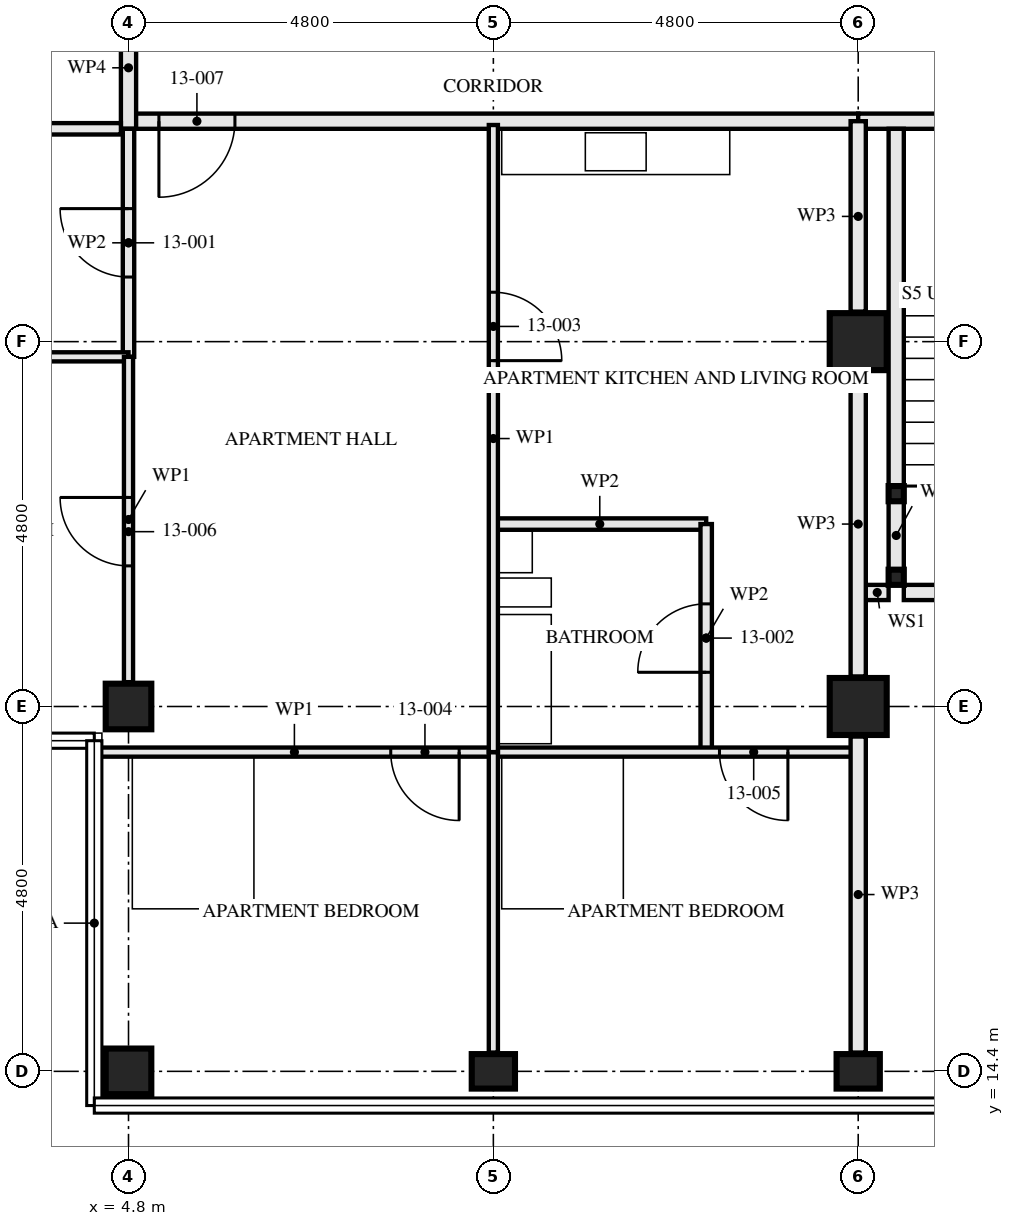
"""IFC4 building model, lengths in metres.
Left out: names, types, materials, properties, quantities, classifications, styles, units other than length and angle.
Written with IfcOpenShell. Run it as: python <this file> out.ifc"""

import sys

from ifc_helpers import new_model, si_unit, direction, frame, frame_2d, origin, origin_2d, place, context, subcontext, project, spatial, rectangle, hollow_rectangle, i_section, extrude, element, fill, save


model = new_model("IFC4")
c1 = context("Model", 3, precision=1e-05, world=origin(), true_north=direction((0.0, 1.0)))
c2 = subcontext(c1, "Body", "Model", "MODEL_VIEW")
j1 = project(units=[si_unit("LENGTHUNIT", "METRE"), si_unit("PLANEANGLEUNIT", "RADIAN")], contexts=[c1])
p1 = place(None, origin())
s1 = spatial("IfcSite", under=j1, at=p1, CompositionType="ELEMENT")
p2 = place(p1, origin())
s2 = spatial("IfcBuilding", under=s1, at=p2, CompositionType="ELEMENT")
p3 = place(p2, frame((0.0, 0.0, 51.5)))
s3 = spatial("IfcBuildingStorey", under=s2, at=p3, CompositionType="ELEMENT", Elevation=51.5)
for number, where, z_axis, x_axis in (
    (1, (4.8, 14.4, 0.0), (0.0, 0.0, 1.0), (0.0, 1.0, 0.0)),
    (2, (4.8, 19.2, 0.0), (0.0, 0.0, 1.0), (0.0, 1.0, 0.0)),
):
    element("IfcColumn", number, at=place(p3, frame(where, z_axis=z_axis, x_axis=x_axis)), inside=s3, PredefinedType="COLUMN", context=c2, shape_type="SweptSolid", body=[
        extrude(hollow_rectangle(XDim=0.6, YDim=0.6, WallThickness=0.05, at=origin_2d()), origin(), (0.0, 0.0, 1.0), 3.5),
    ])
for number, where, z_axis, x_axis in (
    (3, (9.6, 14.4, 0.0), (0.0, 0.0, 1.0), (0.0, 1.0, 0.0)),
    (4, (14.4, 14.4, 0.0), (0.0, 0.0, 1.0), (0.0, 1.0, 0.0)),
):
    element("IfcColumn", number, at=place(p3, frame(where, z_axis=z_axis, x_axis=x_axis)), inside=s3, PredefinedType="COLUMN", context=c2, shape_type="SweptSolid", body=[
        extrude(i_section(OverallWidth=0.454, OverallDepth=0.569, WebThickness=0.078, FlangeThickness=0.125, FilletRadius=0.015, at=origin_2d()), origin(), (0.0, 0.0, 1.0), 3.5),
    ])
for number, where, z_axis, x_axis in (
    (5, (14.4, 19.2, 0.0), (0.0, 0.0, 1.0), (1.0, 0.0, 0.0)),
    (6, (14.4, 24.0, 0.0), (0.0, 0.0, 1.0), (1.0, 0.0, 0.0)),
):
    element("IfcColumn", number, at=place(p3, frame(where, z_axis=z_axis, x_axis=x_axis)), inside=s3, PredefinedType="COLUMN", context=c2, shape_type="SweptSolid", body=[
        extrude(hollow_rectangle(XDim=0.75, YDim=0.75, WallThickness=0.08, at=origin_2d()), origin(), (0.0, 0.0, 1.0), 3.5),
    ])
for number, where, z_axis, x_axis in (
    (7, (14.9, 20.9, 0.0), (0.0, 0.0, 1.0), (1.0, 0.0, 0.0)),
    (8, (14.9, 22.0, 0.0), (0.0, 0.0, 1.0), (1.0, 0.0, 0.0)),
):
    element("IfcColumn", number, at=place(p3, frame(where, z_axis=z_axis, x_axis=x_axis)), inside=s3, PredefinedType="COLUMN", context=c2, shape_type="SweptSolid", body=[
        extrude(hollow_rectangle(XDim=0.2, YDim=0.2, WallThickness=0.008, at=origin_2d()), origin(), (0.0, 0.0, 1.0), 3.33),
    ])
p4 = place(p3, frame((4.8, 23.8, 0.0), z_axis=(0.0, 0.0, 1.0), x_axis=(0.0, 1.0, 0.0)))
e9 = element("IfcWall", 9, at=p4, inside=s3, PredefinedType="PARTITIONING", context=c2, shape_type="SweptSolid", body=[
    extrude(rectangle(XDim=3.0, YDim=0.15, at=frame_2d((1.5, 0.0))), origin(), (0.0, 0.0, 1.0), 2.55),
])
p5 = place(p4, frame((1.05, 0.0, 0.0)))
e10 = element("IfcOpeningElement", 10, at=p5, cuts=e9, PredefinedType="OPENING", context=c2, shape_type="SweptSolid", body=[
    extrude(rectangle(XDim=0.9, YDim=2.1, at=frame_2d((0.45, 1.05))), frame((0.0, 0.085, 0.0), z_axis=(0.0, -1.0, 0.0), x_axis=(1.0, 0.0, 0.0)), (0.0, 0.0, 1.0), 0.171),
])
p6 = place(p3, frame((12.4, 18.6, 0.0), z_axis=(0.0, 0.0, 1.0), x_axis=(0.0, 1.0, 0.0)))
e11 = element("IfcWall", 11, at=p6, inside=s3, PredefinedType="PARTITIONING", context=c2, shape_type="SweptSolid", body=[
    extrude(rectangle(XDim=3.0, YDim=0.15, at=frame_2d((1.5, 0.0))), origin(), (0.0, 0.0, 1.0), 2.55),
])
p7 = place(p6, frame((1.05, 0.0, 0.0)))
e12 = element("IfcOpeningElement", 12, at=p7, cuts=e11, PredefinedType="OPENING", context=c2, shape_type="SweptSolid", body=[
    extrude(rectangle(XDim=0.9, YDim=2.1, at=frame_2d((0.45, 1.05))), frame((0.0, 0.085, 0.0), z_axis=(0.0, -1.0, 0.0), x_axis=(1.0, 0.0, 0.0)), (0.0, 0.0, 1.0), 0.171),
])
p8 = place(p3, frame((9.6, 21.6, 0.0), z_axis=(0.0, 0.0, 1.0), x_axis=(1.0, 0.0, 0.0)))
e13 = element("IfcWall", 13, at=p8, inside=s3, PredefinedType="PARTITIONING", context=c2, shape_type="SweptSolid", body=[
    extrude(rectangle(XDim=2.8, YDim=0.15, at=frame_2d((1.4, 0.0))), origin(), (0.0, 0.0, 1.0), 3.33),
])
p9 = place(p3, frame((9.6, 18.6, 0.0), z_axis=(0.0, 0.0, 1.0), x_axis=(0.0, 1.0, 0.0)))
e14 = element("IfcWall", 14, at=p9, inside=s3, PredefinedType="PARTITIONING", context=c2, shape_type="SweptSolid", body=[
    extrude(rectangle(XDim=8.25, YDim=0.12, at=frame_2d((4.125, 0.0))), origin(), (0.0, 0.0, 1.0), 2.55),
])
p10 = place(p9, frame((5.15, 0.0, 0.0)))
e15 = element("IfcOpeningElement", 15, at=p10, cuts=e14, PredefinedType="OPENING", context=c2, shape_type="SweptSolid", body=[
    extrude(rectangle(XDim=0.9, YDim=2.1, at=frame_2d((0.45, 1.05))), frame((0.0, 0.071, 0.0), z_axis=(0.0, -1.0, 0.0), x_axis=(1.0, 0.0, 0.0)), (0.0, 0.0, 1.0), 0.141),
])
p11 = place(p3, frame((0.247, 23.8, 0.0), z_axis=(0.0, 0.0, 1.0), x_axis=(1.0, 0.0, 0.0)))
e16 = element("IfcWall", 16, at=p11, inside=s3, PredefinedType="PARTITIONING", context=c2, shape_type="SweptSolid", body=[
    extrude(rectangle(XDim=4.553, YDim=0.12, at=frame_2d((2.276, 0.0))), origin(), (0.0, 0.0, 1.0), 3.33),
])
p12 = place(p3, frame((4.365, 18.6, 0.0), z_axis=(0.0, 0.0, 1.0), x_axis=(1.0, 0.0, 0.0)))
e17 = element("IfcWall", 17, at=p12, inside=s3, PredefinedType="PARTITIONING", context=c2, shape_type="SweptSolid", body=[
    extrude(rectangle(XDim=5.235, YDim=0.12, at=frame_2d((2.618, 0.0))), origin(), (0.0, 0.0, 1.0), 2.32),
])
p13 = place(p12, frame((3.885, 0.0, 0.0)))
e18 = element("IfcOpeningElement", 18, at=p13, cuts=e17, PredefinedType="OPENING", context=c2, shape_type="SweptSolid", body=[
    extrude(rectangle(XDim=0.9, YDim=2.1, at=frame_2d((0.45, 1.05))), frame((0.0, 0.071, 0.0), z_axis=(0.0, -1.0, 0.0), x_axis=(1.0, 0.0, 0.0)), (0.0, 0.0, 1.0), 0.141),
])
p14 = place(p3, frame((9.6, 18.6, 0.0), z_axis=(0.0, 0.0, 1.0), x_axis=(1.0, 0.0, 0.0)))
e19 = element("IfcWall", 19, at=p14, inside=s3, PredefinedType="PARTITIONING", context=c2, shape_type="SweptSolid", body=[
    extrude(rectangle(XDim=4.8, YDim=0.12, at=frame_2d((2.4, 0.0))), origin(), (0.0, 0.0, 1.0), 3.33),
])
p15 = place(p14, frame((2.975, 0.0, 0.0)))
e20 = element("IfcOpeningElement", 20, at=p15, cuts=e19, PredefinedType="OPENING", context=c2, shape_type="SweptSolid", body=[
    extrude(rectangle(XDim=0.9, YDim=2.1, at=frame_2d((0.45, 1.05))), frame((0.0, 0.071, 0.0), z_axis=(0.0, -1.0, 0.0), x_axis=(1.0, 0.0, 0.0)), (0.0, 0.0, 1.0), 0.141),
])
p16 = place(p3, frame((4.8, 19.52, 0.0), z_axis=(0.0, 0.0, 1.0), x_axis=(0.0, 1.0, 0.0)))
e21 = element("IfcWall", 21, at=p16, inside=s3, PredefinedType="PARTITIONING", context=c2, shape_type="SweptSolid", body=[
    extrude(rectangle(XDim=4.28, YDim=0.12, at=frame_2d((2.14, 0.0))), origin(), (0.0, 0.0, 1.0), 3.33),
])
p17 = place(p16, frame((1.53, 0.0, 0.0)))
e22 = element("IfcOpeningElement", 22, at=p17, cuts=e21, PredefinedType="OPENING", context=c2, shape_type="SweptSolid", body=[
    extrude(rectangle(XDim=0.9, YDim=2.1, at=frame_2d((0.45, 1.05))), frame((0.0, 0.071, 0.0), z_axis=(0.0, -1.0, 0.0), x_axis=(1.0, 0.0, 0.0)), (0.0, 0.0, 1.0), 0.141),
])
p18 = place(p3, frame((9.6, 14.647, 0.0), z_axis=(0.0, 0.0, 1.0), x_axis=(0.0, 1.0, 0.0)))
e23 = element("IfcWall", 23, at=p18, inside=s3, PredefinedType="PARTITIONING", context=c2, shape_type="SweptSolid", body=[
    extrude(rectangle(XDim=3.953, YDim=0.12, at=frame_2d((1.977, 0.0))), origin(), (0.0, 0.0, 1.0), 3.33),
])
p19 = place(p3, frame((4.8, 26.9, 0.0), z_axis=(0.0, 0.0, 1.0), x_axis=(1.0, 0.0, 0.0)))
e24 = element("IfcWall", 24, at=p19, inside=s3, PredefinedType="PARTITIONING", context=c2, shape_type="SweptSolid", body=[
    extrude(rectangle(XDim=9.6, YDim=0.2, at=frame_2d((4.8, 0.0))), origin(), (0.0, 0.0, 1.0), 3.33),
])
p20 = place(p19, frame((0.4, 0.0, 0.0)))
e25 = element("IfcOpeningElement", 25, at=p20, cuts=e24, PredefinedType="OPENING", context=c2, shape_type="SweptSolid", body=[
    extrude(rectangle(XDim=1.0, YDim=2.1, at=frame_2d((0.5, 1.05))), frame((0.0, 0.111, 0.0), z_axis=(0.0, -1.0, 0.0), x_axis=(1.0, 0.0, 0.0)), (0.0, 0.0, 1.0), 0.221),
])
p21 = place(p3, frame((4.8, 26.8, 0.0), z_axis=(0.0, 0.0, 1.0), x_axis=(0.0, 1.0, 0.0)))
e26 = element("IfcWall", 26, at=p21, inside=s3, PredefinedType="PARTITIONING", context=c2, shape_type="SweptSolid", body=[
    extrude(rectangle(XDim=1.605, YDim=0.2, at=frame_2d((0.802, 0.0))), origin(), (0.0, 0.0, 1.0), 3.33),
])
p22 = place(p3, frame((14.9, 21.0, 0.0), z_axis=(0.0, 0.0, 1.0), x_axis=(0.0, 1.0, 0.0)))
e27 = element("IfcWall", 27, at=p22, inside=s3, PredefinedType="SOLIDWALL", context=c2, shape_type="SweptSolid", body=[
    extrude(rectangle(XDim=0.9, YDim=0.2, at=frame_2d((0.45, 0.0))), origin(), (0.0, 0.0, 1.0), 2.99),
])
p23 = place(p3, frame((14.9, 22.1, 0.0), z_axis=(0.0, 0.0, 1.0), x_axis=(0.0, 1.0, 0.0)))
e28 = element("IfcWall", 28, at=p23, inside=s3, PredefinedType="SOLIDWALL", context=c2, shape_type="SweptSolid", body=[
    extrude(rectangle(XDim=4.7, YDim=0.2, at=frame_2d((2.35, 0.0))), origin(), (0.0, 0.0, 1.0), 2.99),
])
p24 = place(p3, frame((14.5, 20.7, 0.0), z_axis=(0.0, 0.0, 1.0), x_axis=(1.0, 0.0, 0.0)))
e29 = element("IfcWall", 29, at=p24, inside=s3, PredefinedType="SOLIDWALL", context=c2, shape_type="SweptSolid", body=[
    extrude(rectangle(XDim=0.3, YDim=0.2, at=frame_2d((0.15, 0.0))), origin(), (0.0, 0.0, 1.0), 3.33),
])
p25 = place(p3, frame((15.0, 20.7, 0.0), z_axis=(0.0, 0.0, 1.0), x_axis=(1.0, 0.0, 0.0)))
e30 = element("IfcWall", 30, at=p25, inside=s3, PredefinedType="SOLIDWALL", context=c2, shape_type="SweptSolid", body=[
    extrude(rectangle(XDim=2.6, YDim=0.2, at=frame_2d((1.3, 0.0))), origin(), (0.0, 0.0, 1.0), 3.33),
])
p26 = place(p3, frame((14.4, 26.9, 0.0), z_axis=(0.0, 0.0, 1.0), x_axis=(1.0, 0.0, 0.0)))
e31 = element("IfcWall", 31, at=p26, inside=s3, PredefinedType="PARTITIONING", context=c2, shape_type="SweptSolid", body=[
    extrude(rectangle(XDim=14.4, YDim=0.2, at=frame_2d((7.2, 0.0))), origin(), (0.0, 0.0, 1.0), 2.55),
])
p27 = place(p26, frame((1.4, 0.0, 0.0)))
e32 = element("IfcOpeningElement", 32, at=p27, cuts=e31, PredefinedType="OPENING", context=c2, shape_type="SweptSolid", body=[
    extrude(rectangle(XDim=1.0, YDim=2.1, at=frame_2d((0.5, 1.05))), frame((0.0, 0.111, 0.0), z_axis=(0.0, -1.0, 0.0), x_axis=(1.0, 0.0, 0.0)), (0.0, 0.0, 1.0), 0.221),
])
p28 = place(p26, frame((3.65, 0.0, 0.0)))
e33 = element("IfcOpeningElement", 33, at=p28, cuts=e31, PredefinedType="OPENING", context=c2, shape_type="SweptSolid", body=[
    extrude(rectangle(XDim=0.9, YDim=2.1, at=frame_2d((0.45, 1.05))), frame((0.0, 0.111, 0.0), z_axis=(0.0, -1.0, 0.0), x_axis=(1.0, 0.0, 0.0)), (0.0, 0.0, 1.0), 0.221),
])
p29 = place(p26, frame((5.2, 0.0, 0.0)))
e34 = element("IfcOpeningElement", 34, at=p29, cuts=e31, PredefinedType="OPENING", context=c2, shape_type="SweptSolid", body=[
    extrude(rectangle(XDim=1.0, YDim=2.1, at=frame_2d((0.5, 1.05))), frame((0.0, 0.111, 0.0), z_axis=(0.0, -1.0, 0.0), x_axis=(1.0, 0.0, 0.0)), (0.0, 0.0, 1.0), 0.221),
])
p30 = place(p26, frame((10.0, 0.0, 0.0)))
e35 = element("IfcOpeningElement", 35, at=p30, cuts=e31, PredefinedType="OPENING", context=c2, shape_type="SweptSolid", body=[
    extrude(rectangle(XDim=1.0, YDim=2.1, at=frame_2d((0.5, 1.05))), frame((0.0, 0.111, 0.0), z_axis=(0.0, -1.0, 0.0), x_axis=(1.0, 0.0, 0.0)), (0.0, 0.0, 1.0), 0.221),
])
p31 = place(p3, frame((14.4, 14.647, 0.0), z_axis=(0.0, 0.0, 1.0), x_axis=(0.0, 1.0, 0.0)))
e36 = element("IfcWall", 36, at=p31, inside=s3, PredefinedType="PARTITIONING", context=c2, shape_type="SweptSolid", body=[
    extrude(rectangle(XDim=4.158, YDim=0.2, at=frame_2d((2.079, 0.0))), origin(), (0.0, 0.0, 1.0), 2.32),
])
p32 = place(p3, frame((14.4, 19.595, 0.0), z_axis=(0.0, 0.0, 1.0), x_axis=(0.0, 1.0, 0.0)))
e37 = element("IfcWall", 37, at=p32, inside=s3, PredefinedType="PARTITIONING", context=c2, shape_type="SweptSolid", body=[
    extrude(rectangle(XDim=4.01, YDim=0.2, at=frame_2d((2.005, 0.0))), origin(), (0.0, 0.0, 1.0), 2.32),
])
p33 = place(p3, frame((14.4, 24.395, 0.0), z_axis=(0.0, 0.0, 1.0), x_axis=(0.0, 1.0, 0.0)))
e38 = element("IfcWall", 38, at=p33, inside=s3, PredefinedType="PARTITIONING", context=c2, shape_type="SweptSolid", body=[
    extrude(rectangle(XDim=2.505, YDim=0.2, at=frame_2d((1.252, 0.0))), origin(), (0.0, 0.0, 1.0), 2.32),
])
p34 = place(p3, frame((-0.43, 26.8, 0.0), z_axis=(0.0, 0.0, 1.0), x_axis=(1.0, 0.0, 0.0)))
e39 = element("IfcWall", 39, at=p34, inside=s3, PredefinedType="PARTITIONING", context=c2, shape_type="SweptSolid", body=[
    extrude(rectangle(XDim=5.13, YDim=0.15, at=frame_2d((2.565, 0.0))), origin(), (0.0, 0.0, 1.0), 2.32),
])
p35 = place(p5, origin())
e40 = element("IfcDoor", 40, at=p35, inside=s3, OperationType="SINGLE_SWING_LEFT", PredefinedType="DOOR", context=c2, shape_type="SweptSolid", body=[
    extrude(rectangle(XDim=0.9, YDim=2.1, at=frame_2d((0.45, 1.05))), frame((0.0, 0.022, 0.0), z_axis=(0.0, -1.0, 0.0), x_axis=(1.0, 0.0, 0.0)), (0.0, 0.0, 1.0), 0.044),
])
fill(e10, e40)
p36 = place(p7, origin())
e41 = element("IfcDoor", 41, at=p36, inside=s3, OperationType="SINGLE_SWING_RIGHT", PredefinedType="DOOR", context=c2, shape_type="SweptSolid", body=[
    extrude(rectangle(XDim=0.9, YDim=2.1, at=frame_2d((0.45, 1.05))), frame((0.0, 0.022, 0.0), z_axis=(0.0, -1.0, 0.0), x_axis=(1.0, 0.0, 0.0)), (0.0, 0.0, 1.0), 0.044),
])
fill(e12, e41)
p37 = place(p10, frame((0.9, 0.0, 0.0), z_axis=(0.0, 0.0, 1.0), x_axis=(-1.0, 0.0, 0.0)))
e42 = element("IfcDoor", 42, at=p37, inside=s3, OperationType="SINGLE_SWING_LEFT", PredefinedType="DOOR", context=c2, shape_type="SweptSolid", body=[
    extrude(rectangle(XDim=0.9, YDim=2.1, at=frame_2d((0.45, 1.05))), frame((0.0, 0.022, 0.0), z_axis=(0.0, -1.0, 0.0), x_axis=(1.0, 0.0, 0.0)), (0.0, 0.0, 1.0), 0.044),
])
fill(e15, e42)
p38 = place(p13, frame((0.9, 0.0, 0.0), z_axis=(0.0, 0.0, 1.0), x_axis=(-1.0, 0.0, 0.0)))
e43 = element("IfcDoor", 43, at=p38, inside=s3, OperationType="SINGLE_SWING_RIGHT", PredefinedType="DOOR", context=c2, shape_type="SweptSolid", body=[
    extrude(rectangle(XDim=0.9, YDim=2.1, at=frame_2d((0.45, 1.05))), frame((0.0, 0.022, 0.0), z_axis=(0.0, -1.0, 0.0), x_axis=(1.0, 0.0, 0.0)), (0.0, 0.0, 1.0), 0.044),
])
fill(e18, e43)
p39 = place(p15, frame((0.9, 0.0, 0.0), z_axis=(0.0, 0.0, 1.0), x_axis=(-1.0, 0.0, 0.0)))
e44 = element("IfcDoor", 44, at=p39, inside=s3, OperationType="SINGLE_SWING_RIGHT", PredefinedType="DOOR", context=c2, shape_type="SweptSolid", body=[
    extrude(rectangle(XDim=0.9, YDim=2.1, at=frame_2d((0.45, 1.05))), frame((0.0, 0.022, 0.0), z_axis=(0.0, -1.0, 0.0), x_axis=(1.0, 0.0, 0.0)), (0.0, 0.0, 1.0), 0.044),
])
fill(e20, e44)
p40 = place(p17, origin())
e45 = element("IfcDoor", 45, at=p40, inside=s3, OperationType="SINGLE_SWING_LEFT", PredefinedType="DOOR", context=c2, shape_type="SweptSolid", body=[
    extrude(rectangle(XDim=0.9, YDim=2.1, at=frame_2d((0.45, 1.05))), frame((0.0, 0.022, 0.0), z_axis=(0.0, -1.0, 0.0), x_axis=(1.0, 0.0, 0.0)), (0.0, 0.0, 1.0), 0.044),
])
fill(e22, e45)
p41 = place(p20, frame((1.0, 0.0, 0.0), z_axis=(0.0, 0.0, 1.0), x_axis=(-1.0, 0.0, 0.0)))
e46 = element("IfcDoor", 46, at=p41, inside=s3, OperationType="SINGLE_SWING_LEFT", PredefinedType="DOOR", context=c2, shape_type="SweptSolid", body=[
    extrude(rectangle(XDim=1.0, YDim=2.1, at=frame_2d((0.5, 1.05))), frame((0.0, 0.027, 0.0), z_axis=(0.0, -1.0, 0.0), x_axis=(1.0, 0.0, 0.0)), (0.0, 0.0, 1.0), 0.054),
])
fill(e25, e46)
save(model, sys.argv[1])
